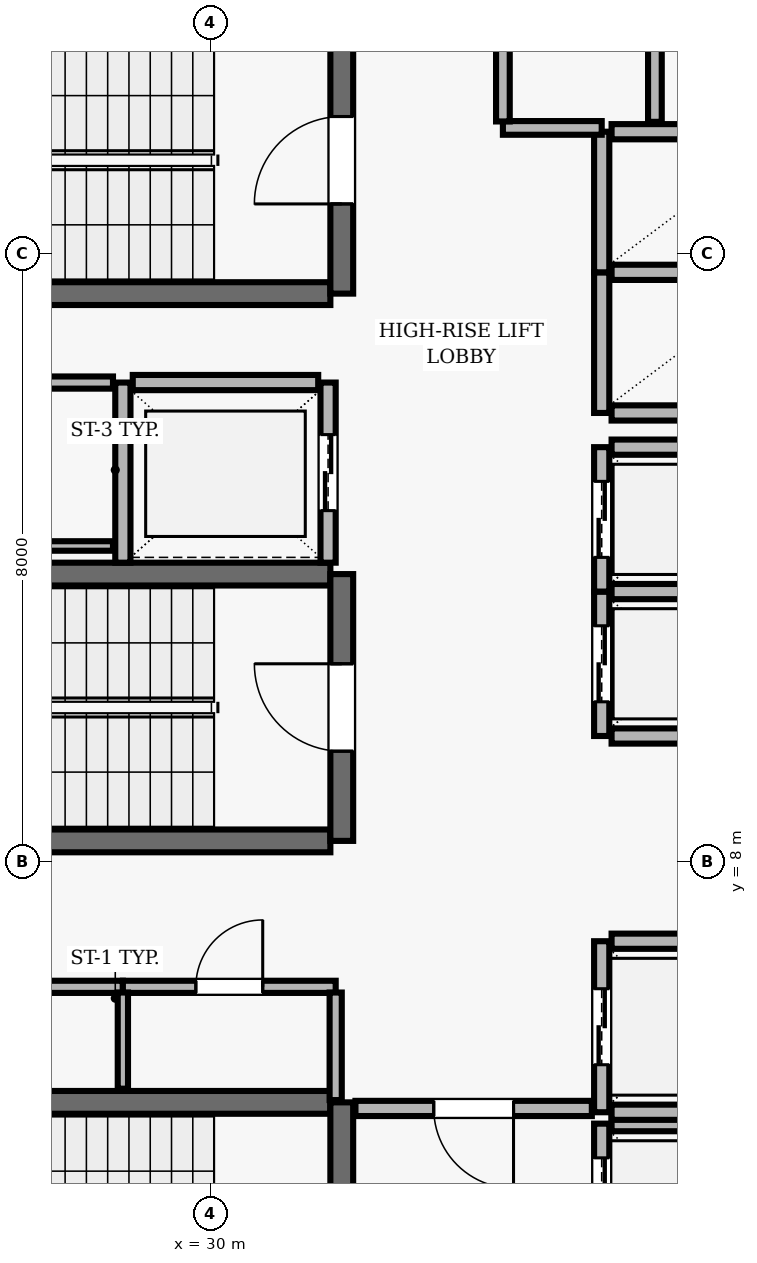
"""IFC4 building model, lengths in metres.
Left out: names, types, materials, properties, quantities, classifications, styles, units other than length and angle.
Written with IfcOpenShell. Run it as: python <this file> out.ifc"""

import sys

from ifc_helpers import new_model, si_unit, direction, frame, frame_2d, origin, place, context, subcontext, project, spatial, rectangle, extrude, element, fill, save


model = new_model("IFC4")
c1 = context("Model", 3, precision=1e-05, world=origin(), true_north=direction((0.0, 1.0)))
c2 = subcontext(c1, "Body", "Model", "MODEL_VIEW")
j1 = project(units=[si_unit("LENGTHUNIT", "METRE"), si_unit("PLANEANGLEUNIT", "RADIAN")], contexts=[c1])
p1 = place(None, origin())
s1 = spatial("IfcSite", under=j1, at=p1, CompositionType="ELEMENT")
p2 = place(p1, origin())
s2 = spatial("IfcBuilding", under=s1, at=p2, CompositionType="ELEMENT")
p3 = place(p2, frame((0.0, 0.0, 234.3)))
s3 = spatial("IfcBuildingStorey", under=s2, at=p3, CompositionType="ELEMENT", Elevation=234.3)
p4 = place(p3, frame((31.58, 4.83, 0.0), z_axis=(0.0, 0.0, 1.0), x_axis=(-1.0, 0.0, 0.0)))
e1 = element("IfcWall", 1, at=p4, inside=s3, PredefinedType="SHEAR", context=c2, shape_type="SweptSolid", body=[
    extrude(rectangle(XDim=8.36, YDim=0.3, at=frame_2d((4.18, 0.0))), origin(), (0.0, 0.0, 1.0), 3.64),
])
p5 = place(p3, frame((31.73, 0.96, 0.0), z_axis=(0.0, 0.0, 1.0), x_axis=(0.0, 1.0, 0.0)))
e2 = element("IfcWall", 2, at=p5, inside=s3, PredefinedType="SHEAR", context=c2, shape_type="SweptSolid", body=[
    extrude(rectangle(XDim=3.87, YDim=0.3, at=frame_2d((1.935, 0.0))), origin(), (0.0, 0.0, 1.0), 3.64),
])
p6 = place(p5, frame((1.54, 0.0, 0.0)))
e3 = element("IfcOpeningElement", 3, at=p6, cuts=e2, PredefinedType="OPENING", context=c2, shape_type="SweptSolid", body=[
    extrude(rectangle(XDim=1.15, YDim=2.15, at=frame_2d((0.575, 1.075))), frame((0.0, 0.16, 0.0), z_axis=(0.0, -1.0, 0.0), x_axis=(1.0, 0.0, 0.0)), (0.0, 0.0, 1.0), 0.32),
])
p7 = place(p3, frame((23.22, 15.47, 0.0), z_axis=(0.0, 0.0, 1.0), x_axis=(1.0, 0.0, 0.0)))
e4 = element("IfcWall", 4, at=p7, inside=s3, PredefinedType="SHEAR", context=c2, shape_type="SweptSolid", body=[
    extrude(rectangle(XDim=8.36, YDim=0.3, at=frame_2d((4.18, 0.0))), origin(), (0.0, 0.0, 1.0), 3.64),
])
p8 = place(p3, frame((31.73, 15.47, 0.0), z_axis=(0.0, 0.0, 1.0), x_axis=(0.0, 1.0, 0.0)))
e5 = element("IfcWall", 5, at=p8, inside=s3, PredefinedType="SHEAR", context=c2, shape_type="SweptSolid", body=[
    extrude(rectangle(XDim=3.51, YDim=0.3, at=frame_2d((1.755, 0.0))), origin(), (0.0, 0.0, 1.0), 3.64),
])
p9 = place(p8, frame((1.18, 0.0, 0.0)))
e6 = element("IfcOpeningElement", 6, at=p9, cuts=e5, PredefinedType="OPENING", context=c2, shape_type="SweptSolid", body=[
    extrude(rectangle(XDim=1.15, YDim=2.15, at=frame_2d((0.575, 1.075))), frame((0.0, 0.16, 0.0), z_axis=(0.0, -1.0, 0.0), x_axis=(1.0, 0.0, 0.0)), (0.0, 0.0, 1.0), 0.32),
])
for number, where, z_axis, x_axis in (
    (7, (31.58, 11.78, 0.0), (0.0, 0.0, 1.0), (-1.0, 0.0, 0.0)),
    (8, (23.22, 8.27, 0.0), (0.0, 0.0, 1.0), (1.0, 0.0, 0.0)),
):
    element("IfcWall", number, at=place(p3, frame(where, z_axis=z_axis, x_axis=x_axis)), inside=s3, PredefinedType="SHEAR", context=c2, shape_type="SweptSolid", body=[
        extrude(rectangle(XDim=8.36, YDim=0.3, at=frame_2d((4.18, 0.0))), origin(), (0.0, 0.0, 1.0), 3.64),
    ])
p10 = place(p3, frame((31.73, 8.27, 0.0), z_axis=(0.0, 0.0, 1.0), x_axis=(0.0, 1.0, 0.0)))
e9 = element("IfcWall", 9, at=p10, inside=s3, PredefinedType="SHEAR", context=c2, shape_type="SweptSolid", body=[
    extrude(rectangle(XDim=3.51, YDim=0.3, at=frame_2d((1.755, 0.0))), origin(), (0.0, 0.0, 1.0), 3.64),
])
p11 = place(p10, frame((1.18, 0.0, 0.0)))
e10 = element("IfcOpeningElement", 10, at=p11, cuts=e9, PredefinedType="OPENING", context=c2, shape_type="SweptSolid", body=[
    extrude(rectangle(XDim=1.15, YDim=2.15, at=frame_2d((0.575, 1.075))), frame((0.0, 0.16, 0.0), z_axis=(0.0, -1.0, 0.0), x_axis=(1.0, 0.0, 0.0)), (0.0, 0.0, 1.0), 0.32),
])
p12 = place(p3, frame((35.15, 4.55, 0.0), z_axis=(0.0, 0.0, 1.0), x_axis=(0.0, -1.0, 0.0)))
e11 = element("IfcWall", 11, at=p12, inside=s3, PredefinedType="SOLIDWALL", context=c2, shape_type="SweptSolid", body=[
    extrude(rectangle(XDim=2.1, YDim=0.2, at=frame_2d((1.05, 0.0))), origin(), (0.0, 0.0, 1.0), 3.64),
])
p13 = place(p12, frame((0.45, 0.0, 0.0)))
e12 = element("IfcOpeningElement", 12, at=p13, cuts=e11, PredefinedType="OPENING", context=c2, shape_type="SweptSolid", body=[
    extrude(rectangle(XDim=1.2, YDim=2.15, at=frame_2d((0.6, 1.075))), frame((0.0, 0.11, 0.0), z_axis=(0.0, -1.0, 0.0), x_axis=(1.0, 0.0, 0.0)), (0.0, 0.0, 1.0), 0.22),
])
p14 = place(p3, frame((37.42, 4.55, 0.0), z_axis=(0.0, 0.0, 1.0), x_axis=(-1.0, 0.0, 0.0)))
e13 = element("IfcWall", 13, at=p14, inside=s3, PredefinedType="SOLIDWALL", context=c2, shape_type="SweptSolid", body=[
    extrude(rectangle(XDim=2.14, YDim=0.2, at=frame_2d((1.07, 0.0))), origin(), (0.0, 0.0, 1.0), 3.64),
])
p15 = place(p3, frame((35.15, 6.95, 0.0), z_axis=(0.0, 0.0, 1.0), x_axis=(0.0, -1.0, 0.0)))
e14 = element("IfcWall", 14, at=p15, inside=s3, PredefinedType="SOLIDWALL", context=c2, shape_type="SweptSolid", body=[
    extrude(rectangle(XDim=2.25, YDim=0.2, at=frame_2d((1.125, 0.0))), origin(), (0.0, 0.0, 1.0), 3.64),
])
p16 = place(p15, frame((0.625, 0.0, 0.0)))
e15 = element("IfcOpeningElement", 15, at=p16, cuts=e14, PredefinedType="OPENING", context=c2, shape_type="SweptSolid", body=[
    extrude(rectangle(XDim=1.0, YDim=2.1, at=frame_2d((0.5, 1.05))), frame((0.0, 0.11, 0.0), z_axis=(0.0, -1.0, 0.0), x_axis=(1.0, 0.0, 0.0)), (0.0, 0.0, 1.0), 0.22),
])
for number, where, z_axis, x_axis in (
    (16, (35.28, 4.7, 0.0), (0.0, 0.0, 1.0), (1.0, 0.0, 0.0)),
    (17, (37.42, 6.95, 0.0), (0.0, 0.0, 1.0), (-1.0, 0.0, 0.0)),
):
    element("IfcWall", number, at=place(p3, frame(where, z_axis=z_axis, x_axis=x_axis)), inside=s3, PredefinedType="SOLIDWALL", context=c2, shape_type="SweptSolid", body=[
        extrude(rectangle(XDim=2.14, YDim=0.2, at=frame_2d((1.07, 0.0))), origin(), (0.0, 0.0, 1.0), 3.64),
    ])
p17 = place(p3, frame((35.15, 11.55, 0.0), z_axis=(0.0, 0.0, 1.0), x_axis=(0.0, -1.0, 0.0)))
e18 = element("IfcWall", 18, at=p17, inside=s3, PredefinedType="SOLIDWALL", context=c2, shape_type="SweptSolid", body=[
    extrude(rectangle(XDim=1.9, YDim=0.2, at=frame_2d((0.95, 0.0))), origin(), (0.0, 0.0, 1.0), 3.64),
])
p18 = place(p17, frame((0.45, 0.0, 0.0)))
e19 = element("IfcOpeningElement", 19, at=p18, cuts=e18, PredefinedType="OPENING", context=c2, shape_type="SweptSolid", body=[
    extrude(rectangle(XDim=1.0, YDim=2.1, at=frame_2d((0.5, 1.05))), frame((0.0, 0.11, 0.0), z_axis=(0.0, -1.0, 0.0), x_axis=(1.0, 0.0, 0.0)), (0.0, 0.0, 1.0), 0.22),
])
for number, where, z_axis, x_axis in (
    (20, (35.28, 9.65, 0.0), (0.0, 0.0, 1.0), (1.0, 0.0, 0.0)),
    (21, (37.42, 11.55, 0.0), (0.0, 0.0, 1.0), (-1.0, 0.0, 0.0)),
):
    element("IfcWall", number, at=place(p3, frame(where, z_axis=z_axis, x_axis=x_axis)), inside=s3, PredefinedType="SOLIDWALL", context=c2, shape_type="SweptSolid", body=[
        extrude(rectangle(XDim=2.14, YDim=0.2, at=frame_2d((1.07, 0.0))), origin(), (0.0, 0.0, 1.0), 3.64),
    ])
p19 = place(p3, frame((35.15, 13.45, 0.0), z_axis=(0.0, 0.0, 1.0), x_axis=(0.0, -1.0, 0.0)))
e22 = element("IfcWall", 22, at=p19, inside=s3, PredefinedType="SOLIDWALL", context=c2, shape_type="SweptSolid", body=[
    extrude(rectangle(XDim=1.9, YDim=0.2, at=frame_2d((0.95, 0.0))), origin(), (0.0, 0.0, 1.0), 3.64),
])
p20 = place(p19, frame((0.45, 0.0, 0.0)))
e23 = element("IfcOpeningElement", 23, at=p20, cuts=e22, PredefinedType="OPENING", context=c2, shape_type="SweptSolid", body=[
    extrude(rectangle(XDim=1.0, YDim=2.1, at=frame_2d((0.5, 1.05))), frame((0.0, 0.11, 0.0), z_axis=(0.0, -1.0, 0.0), x_axis=(1.0, 0.0, 0.0)), (0.0, 0.0, 1.0), 0.22),
])
p21 = place(p3, frame((37.42, 13.45, 0.0), z_axis=(0.0, 0.0, 1.0), x_axis=(-1.0, 0.0, 0.0)))
e24 = element("IfcWall", 24, at=p21, inside=s3, PredefinedType="SOLIDWALL", context=c2, shape_type="SweptSolid", body=[
    extrude(rectangle(XDim=2.14, YDim=0.2, at=frame_2d((1.07, 0.0))), origin(), (0.0, 0.0, 1.0), 3.64),
])
p22 = place(p3, frame((28.85, 14.3, 0.0), z_axis=(0.0, 0.0, 1.0), x_axis=(0.0, -1.0, 0.0)))
e25 = element("IfcWall", 25, at=p22, inside=s3, PredefinedType="SOLIDWALL", context=c2, shape_type="SweptSolid", body=[
    extrude(rectangle(XDim=2.37, YDim=0.2, at=frame_2d((1.185, 0.0))), origin(), (0.0, 0.0, 1.0), 3.64),
])
p23 = place(p3, frame((31.55, 11.93, 0.0), z_axis=(0.0, 0.0, 1.0), x_axis=(0.0, 1.0, 0.0)))
e26 = element("IfcWall", 26, at=p23, inside=s3, PredefinedType="SOLIDWALL", context=c2, shape_type="SweptSolid", body=[
    extrude(rectangle(XDim=2.37, YDim=0.2, at=frame_2d((1.185, 0.0))), origin(), (0.0, 0.0, 1.0), 3.64),
])
p24 = place(p23, frame((0.685, 0.0, 0.0)))
e27 = element("IfcOpeningElement", 27, at=p24, cuts=e26, PredefinedType="OPENING", context=c2, shape_type="SweptSolid", body=[
    extrude(rectangle(XDim=1.0, YDim=2.1, at=frame_2d((0.5, 1.05))), frame((0.0, 0.11, 0.0), z_axis=(0.0, -1.0, 0.0), x_axis=(1.0, 0.0, 0.0)), (0.0, 0.0, 1.0), 0.22),
])
p25 = place(p3, frame((31.42, 14.3, 0.0), z_axis=(0.0, 0.0, 1.0), x_axis=(-1.0, 0.0, 0.0)))
e28 = element("IfcWall", 28, at=p25, inside=s3, PredefinedType="SOLIDWALL", context=c2, shape_type="SweptSolid", body=[
    extrude(rectangle(XDim=2.44, YDim=0.2, at=frame_2d((1.22, 0.0))), origin(), (0.0, 0.0, 1.0), 3.64),
])
p26 = place(p3, frame((35.15, 15.75, 0.0), z_axis=(0.0, 0.0, 1.0), x_axis=(0.0, -1.0, 0.0)))
e29 = element("IfcWall", 29, at=p26, inside=s3, PredefinedType="SOLIDWALL", context=c2, shape_type="SweptSolid", body=[
    extrude(rectangle(XDim=1.85, YDim=0.2, at=frame_2d((0.925, 0.0))), origin(), (0.0, 0.0, 1.0), 3.64),
])
for number, where, z_axis, x_axis in (
    (30, (35.28, 13.9, 0.0), (0.0, 0.0, 1.0), (1.0, 0.0, 0.0)),
    (31, (37.42, 15.75, 0.0), (0.0, 0.0, 1.0), (-1.0, 0.0, 0.0)),
):
    element("IfcWall", number, at=place(p3, frame(where, z_axis=z_axis, x_axis=x_axis)), inside=s3, PredefinedType="SOLIDWALL", context=c2, shape_type="SweptSolid", body=[
        extrude(rectangle(XDim=2.14, YDim=0.2, at=frame_2d((1.07, 0.0))), origin(), (0.0, 0.0, 1.0), 3.64),
    ])
p27 = place(p3, frame((35.15, 17.6, 0.0), z_axis=(0.0, 0.0, 1.0), x_axis=(0.0, -1.0, 0.0)))
e32 = element("IfcWall", 32, at=p27, inside=s3, PredefinedType="SOLIDWALL", context=c2, shape_type="SweptSolid", body=[
    extrude(rectangle(XDim=1.85, YDim=0.2, at=frame_2d((0.925, 0.0))), origin(), (0.0, 0.0, 1.0), 3.64),
])
p28 = place(p3, frame((37.42, 17.6, 0.0), z_axis=(0.0, 0.0, 1.0), x_axis=(-1.0, 0.0, 0.0)))
e33 = element("IfcWall", 33, at=p28, inside=s3, PredefinedType="SOLIDWALL", context=c2, shape_type="SweptSolid", body=[
    extrude(rectangle(XDim=2.14, YDim=0.2, at=frame_2d((1.07, 0.0))), origin(), (0.0, 0.0, 1.0), 3.64),
])
p29 = place(p3, frame((24.35, 12.15, 0.0), z_axis=(0.0, 0.0, 1.0), x_axis=(1.0, 0.0, 0.0)))
e34 = element("IfcWall", 34, at=p29, inside=s3, PredefinedType="PARTITIONING", context=c2, shape_type="SweptSolid", body=[
    extrude(rectangle(XDim=4.37, YDim=0.125, at=frame_2d((2.185, 0.0))), origin(), (0.0, 0.0, 1.0), 3.64),
])
p30 = place(p3, frame((24.35, 14.3, 0.0), z_axis=(0.0, 0.0, 1.0), x_axis=(1.0, 0.0, 0.0)))
e35 = element("IfcWall", 35, at=p30, inside=s3, PredefinedType="PARTITIONING", context=c2, shape_type="SweptSolid", body=[
    extrude(rectangle(XDim=4.37, YDim=0.16, at=frame_2d((2.185, 0.0))), origin(), (0.0, 0.0, 1.0), 3.64),
])
p31 = place(p30, frame((1.735, 0.0, 0.0)))
e36 = element("IfcOpeningElement", 36, at=p31, cuts=e35, PredefinedType="OPENING", context=c2, shape_type="SweptSolid", body=[
    extrude(rectangle(XDim=0.9, YDim=2.1, at=frame_2d((0.45, 1.05))), frame((0.0, 0.09, 0.0), z_axis=(0.0, -1.0, 0.0), x_axis=(1.0, 0.0, 0.0)), (0.0, 0.0, 1.0), 0.18),
])
p32 = place(p3, frame((26.0, 6.35, 0.0), z_axis=(0.0, 0.0, 1.0), x_axis=(1.0, 0.0, 0.0)))
e37 = element("IfcWall", 37, at=p32, inside=s3, PredefinedType="PARTITIONING", context=c2, shape_type="SweptSolid", body=[
    extrude(rectangle(XDim=2.85, YDim=0.16, at=frame_2d((1.425, 0.0))), origin(), (0.0, 0.0, 1.0), 3.64),
])
p33 = place(p32, frame((0.985, 0.0, 0.0)))
e38 = element("IfcOpeningElement", 38, at=p33, cuts=e37, PredefinedType="OPENING", context=c2, shape_type="SweptSolid", body=[
    extrude(rectangle(XDim=0.88, YDim=2.1, at=frame_2d((0.44, 1.05))), frame((0.0, 0.09, 0.0), z_axis=(0.0, -1.0, 0.0), x_axis=(1.0, 0.0, 0.0)), (0.0, 0.0, 1.0), 0.18),
])
p34 = place(p3, frame((28.85, 6.35, 0.0), z_axis=(0.0, 0.0, 1.0), x_axis=(1.0, 0.0, 0.0)))
e39 = element("IfcWall", 39, at=p34, inside=s3, PredefinedType="PARTITIONING", context=c2, shape_type="SweptSolid", body=[
    extrude(rectangle(XDim=2.8, YDim=0.16, at=frame_2d((1.4, 0.0))), origin(), (0.0, 0.0, 1.0), 3.64),
])
p35 = place(p34, frame((0.96, 0.0, 0.0)))
e40 = element("IfcOpeningElement", 40, at=p35, cuts=e39, PredefinedType="OPENING", context=c2, shape_type="SweptSolid", body=[
    extrude(rectangle(XDim=0.88, YDim=2.1, at=frame_2d((0.44, 1.05))), frame((0.0, 0.09, 0.0), z_axis=(0.0, -1.0, 0.0), x_axis=(1.0, 0.0, 0.0)), (0.0, 0.0, 1.0), 0.18),
])
p36 = place(p3, frame((33.85, 17.65, 0.0), z_axis=(0.0, 0.0, 1.0), x_axis=(1.0, 0.0, 0.0)))
e41 = element("IfcWall", 41, at=p36, inside=s3, PredefinedType="PARTITIONING", context=c2, shape_type="SweptSolid", body=[
    extrude(rectangle(XDim=1.3, YDim=0.18, at=frame_2d((0.65, 0.0))), origin(), (0.0, 0.0, 1.0), 3.64),
])
p37 = place(p3, frame((35.02, 4.75, 0.0), z_axis=(0.0, 0.0, 1.0), x_axis=(-1.0, 0.0, 0.0)))
e42 = element("IfcWall", 42, at=p37, inside=s3, PredefinedType="SOLIDWALL", context=c2, shape_type="SweptSolid", body=[
    extrude(rectangle(XDim=3.11, YDim=0.2, at=frame_2d((1.555, 0.0))), origin(), (0.0, 0.0, 1.0), 3.64),
])
p38 = place(p37, frame((1.03, 0.0, 0.0)))
e43 = element("IfcOpeningElement", 43, at=p38, cuts=e42, PredefinedType="OPENING", context=c2, shape_type="SweptSolid", body=[
    extrude(rectangle(XDim=1.05, YDim=2.15, at=frame_2d((0.525, 1.075))), frame((0.0, 0.11, 0.0), z_axis=(0.0, -1.0, 0.0), x_axis=(1.0, 0.0, 0.0)), (0.0, 0.0, 1.0), 0.22),
])
p39 = place(p3, frame((28.85, 5.01, 0.0), z_axis=(0.0, 0.0, 1.0), x_axis=(0.0, 1.0, 0.0)))
e44 = element("IfcWall", 44, at=p39, inside=s3, PredefinedType="PARTITIONING", context=c2, shape_type="SweptSolid", body=[
    extrude(rectangle(XDim=1.265, YDim=0.135, at=frame_2d((0.632, 0.0))), origin(), (0.0, 0.0, 1.0), 3.64),
])
p40 = place(p3, frame((31.65, 4.86, 0.0), z_axis=(0.0, 0.0, 1.0), x_axis=(0.0, 1.0, 0.0)))
e45 = element("IfcWall", 45, at=p40, inside=s3, PredefinedType="PARTITIONING", context=c2, shape_type="SweptSolid", body=[
    extrude(rectangle(XDim=1.415, YDim=0.16, at=frame_2d((0.708, 0.0))), origin(), (0.0, 0.0, 1.0), 3.64),
])
p41 = place(p3, frame((33.85, 17.735, 0.0), z_axis=(0.0, 0.0, 1.0), x_axis=(0.0, 1.0, 0.0)))
e46 = element("IfcWall", 46, at=p41, inside=s3, PredefinedType="PARTITIONING", context=c2, shape_type="SweptSolid", body=[
    extrude(rectangle(XDim=6.03, YDim=0.18, at=frame_2d((3.015, 0.0))), origin(), (0.0, 0.0, 1.0), 3.64),
])
p42 = place(p41, frame((2.54, 0.0, 0.0)))
e47 = element("IfcOpeningElement", 47, at=p42, cuts=e46, PredefinedType="OPENING", context=c2, shape_type="SweptSolid", body=[
    extrude(rectangle(XDim=0.95, YDim=2.1, at=frame_2d((0.475, 1.05))), frame((0.0, 0.1, 0.0), z_axis=(0.0, -1.0, 0.0), x_axis=(1.0, 0.0, 0.0)), (0.0, 0.0, 1.0), 0.2),
])
p43 = place(p3, frame((35.85, 17.73, 0.0), z_axis=(0.0, 0.0, 1.0), x_axis=(0.0, 1.0, 0.0)))
e48 = element("IfcWall", 48, at=p43, inside=s3, PredefinedType="PARTITIONING", context=c2, shape_type="SweptSolid", body=[
    extrude(rectangle(XDim=3.412, YDim=0.18, at=frame_2d((1.706, 0.0))), origin(), (0.0, 0.0, 1.0), 3.64),
])
p44 = place(p43, frame((1.256, 0.0, 0.0)))
e49 = element("IfcOpeningElement", 49, at=p44, cuts=e48, PredefinedType="OPENING", context=c2, shape_type="SweptSolid", body=[
    extrude(rectangle(XDim=0.9, YDim=2.1, at=frame_2d((0.45, 1.05))), frame((0.0, 0.1, 0.0), z_axis=(0.0, -1.0, 0.0), x_axis=(1.0, 0.0, 0.0)), (0.0, 0.0, 1.0), 0.2),
])
p45 = place(p9, origin())
e50 = element("IfcDoor", 50, at=p45, inside=s3, OperationType="SINGLE_SWING_LEFT", PredefinedType="DOOR", context=c2, shape_type="SweptSolid", body=[
    extrude(rectangle(XDim=1.15, YDim=2.15, at=frame_2d((0.575, 1.075))), frame((0.0, 0.025, 0.0), z_axis=(0.0, -1.0, 0.0), x_axis=(1.0, 0.0, 0.0)), (0.0, 0.0, 1.0), 0.05),
])
fill(e6, e50)
p46 = place(p11, origin())
e51 = element("IfcDoor", 51, at=p46, inside=s3, OperationType="SINGLE_SWING_RIGHT", PredefinedType="DOOR", context=c2, shape_type="SweptSolid", body=[
    extrude(rectangle(XDim=1.15, YDim=2.15, at=frame_2d((0.575, 1.075))), frame((0.0, 0.025, 0.0), z_axis=(0.0, -1.0, 0.0), x_axis=(1.0, 0.0, 0.0)), (0.0, 0.0, 1.0), 0.05),
])
fill(e10, e51)
p47 = place(p13, origin())
e52 = element("IfcDoor", 52, at=p47, inside=s3, OperationType="DOUBLE_DOOR_SLIDING", PredefinedType="DOOR", context=c2, shape_type="SweptSolid", body=[
    extrude(rectangle(XDim=1.2, YDim=2.15, at=frame_2d((0.6, 1.075))), frame((0.0, 0.025, 0.0), z_axis=(0.0, -1.0, 0.0), x_axis=(1.0, 0.0, 0.0)), (0.0, 0.0, 1.0), 0.05),
])
fill(e12, e52)
p48 = place(p16, origin())
e53 = element("IfcDoor", 53, at=p48, inside=s3, OperationType="DOUBLE_DOOR_SLIDING", PredefinedType="DOOR", context=c2, shape_type="SweptSolid", body=[
    extrude(rectangle(XDim=1.0, YDim=2.1, at=frame_2d((0.5, 1.05))), frame((0.0, 0.025, 0.0), z_axis=(0.0, -1.0, 0.0), x_axis=(1.0, 0.0, 0.0)), (0.0, 0.0, 1.0), 0.05),
])
fill(e15, e53)
p49 = place(p18, origin())
e54 = element("IfcDoor", 54, at=p49, inside=s3, OperationType="DOUBLE_DOOR_SLIDING", PredefinedType="DOOR", context=c2, shape_type="SweptSolid", body=[
    extrude(rectangle(XDim=1.0, YDim=2.1, at=frame_2d((0.5, 1.05))), frame((0.0, 0.025, 0.0), z_axis=(0.0, -1.0, 0.0), x_axis=(1.0, 0.0, 0.0)), (0.0, 0.0, 1.0), 0.05),
])
fill(e19, e54)
p50 = place(p20, origin())
e55 = element("IfcDoor", 55, at=p50, inside=s3, OperationType="DOUBLE_DOOR_SLIDING", PredefinedType="DOOR", context=c2, shape_type="SweptSolid", body=[
    extrude(rectangle(XDim=1.0, YDim=2.1, at=frame_2d((0.5, 1.05))), frame((0.0, 0.025, 0.0), z_axis=(0.0, -1.0, 0.0), x_axis=(1.0, 0.0, 0.0)), (0.0, 0.0, 1.0), 0.05),
])
fill(e23, e55)
p51 = place(p24, origin())
e56 = element("IfcDoor", 56, at=p51, inside=s3, OperationType="DOUBLE_DOOR_SLIDING", PredefinedType="DOOR", context=c2, shape_type="SweptSolid", body=[
    extrude(rectangle(XDim=1.0, YDim=2.1, at=frame_2d((0.5, 1.05))), frame((0.0, 0.025, 0.0), z_axis=(0.0, -1.0, 0.0), x_axis=(1.0, 0.0, 0.0)), (0.0, 0.0, 1.0), 0.05),
])
fill(e27, e56)
p52 = place(p38, origin())
e57 = element("IfcDoor", 57, at=p52, inside=s3, OperationType="SINGLE_SWING_LEFT", PredefinedType="DOOR", context=c2, shape_type="SweptSolid", body=[
    extrude(rectangle(XDim=1.05, YDim=2.15, at=frame_2d((0.525, 1.075))), frame((0.0, 0.025, 0.0), z_axis=(0.0, -1.0, 0.0), x_axis=(1.0, 0.0, 0.0)), (0.0, 0.0, 1.0), 0.05),
])
fill(e43, e57)
p53 = place(p35, origin())
e58 = element("IfcDoor", 58, at=p53, inside=s3, OperationType="SINGLE_SWING_RIGHT", PredefinedType="DOOR", context=c2, shape_type="SweptSolid", body=[
    extrude(rectangle(XDim=0.88, YDim=2.1, at=frame_2d((0.44, 1.05))), frame((0.0, 0.025, 0.0), z_axis=(0.0, -1.0, 0.0), x_axis=(1.0, 0.0, 0.0)), (0.0, 0.0, 1.0), 0.05),
])
fill(e40, e58)
save(model, sys.argv[1])
